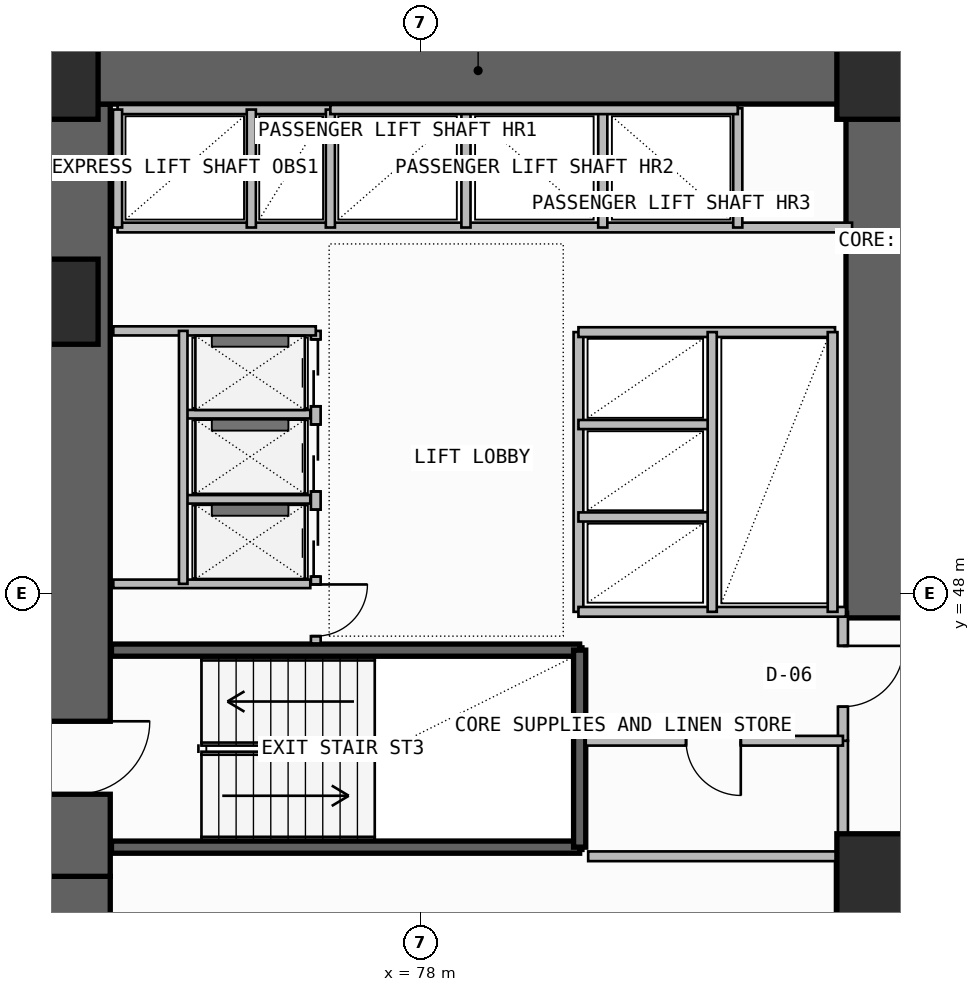
"""IFC4 building model, lengths in metres.
Left out: names, types, materials, properties, quantities, classifications, styles, units other than length and angle.
Written with IfcOpenShell. Run it as: python <this file> out.ifc"""

import sys

from ifc_helpers import new_model, si_unit, direction, frame, frame_2d, origin, origin_2d, place, context, subcontext, project, spatial, rectangle, extrude, element, fill, save


model = new_model("IFC4")
c1 = context("Model", 3, precision=1e-05, world=origin(), true_north=direction((0.0, 1.0)))
c2 = subcontext(c1, "Body", "Model", "MODEL_VIEW")
j1 = project(units=[si_unit("LENGTHUNIT", "METRE"), si_unit("PLANEANGLEUNIT", "RADIAN")], contexts=[c1])
p1 = place(None, origin())
s1 = spatial("IfcSite", under=j1, at=p1, CompositionType="ELEMENT")
p2 = place(p1, origin())
s2 = spatial("IfcBuilding", under=s1, at=p2, CompositionType="ELEMENT")
p3 = place(p2, frame((0.0, 0.0, 48.3)))
s3 = spatial("IfcBuildingStorey", under=s2, at=p3, CompositionType="ELEMENT", Elevation=48.3)
p4 = place(p3, frame((72.35, 35.5, -0.26), z_axis=(0.0, 0.0, 1.0), x_axis=(0.0, 1.0, 0.0)))
e1 = element("IfcWall", 1, at=p4, inside=s3, PredefinedType="SHEAR", context=c2, shape_type="SweptSolid", body=[
    extrude(rectangle(XDim=7.85, YDim=1.1, at=frame_2d((3.925, 0.0))), origin(), (0.0, 0.0, 1.0), 3.66),
])
p5 = place(p4, frame((1.45, 0.0, 0.26)))
e2 = element("IfcOpeningElement", 2, at=p5, cuts=e1, PredefinedType="OPENING", context=c2, shape_type="SweptSolid", body=[
    extrude(rectangle(XDim=1.2, YDim=2.2, at=frame_2d((0.6, 1.1))), frame((0.0, 0.56, 0.0), z_axis=(0.0, -1.0, 0.0), x_axis=(1.0, 0.0, 0.0)), (0.0, 0.0, 1.0), 1.12),
])
p6 = place(p3, frame((72.35, 43.35, -0.26), z_axis=(0.0, 0.0, 1.0), x_axis=(0.0, 1.0, 0.0)))
e3 = element("IfcWall", 3, at=p6, inside=s3, PredefinedType="SHEAR", context=c2, shape_type="SweptSolid", body=[
    extrude(rectangle(XDim=12.7, YDim=1.1, at=frame_2d((6.35, 0.0))), origin(), (0.0, 0.0, 1.0), 3.66),
])
p7 = place(p6, frame((1.35, 0.0, 0.26)))
e4 = element("IfcOpeningElement", 4, at=p7, cuts=e3, PredefinedType="OPENING", context=c2, shape_type="SweptSolid", body=[
    extrude(rectangle(XDim=1.2, YDim=2.2, at=frame_2d((0.6, 1.1))), frame((0.0, 0.56, 0.0), z_axis=(0.0, -1.0, 0.0), x_axis=(1.0, 0.0, 0.0)), (0.0, 0.0, 1.0), 1.12),
])
p8 = place(p3, frame((71.8, 56.6, -0.26), z_axis=(0.0, 0.0, 1.0), x_axis=(1.0, 0.0, 0.0)))
e5 = element("IfcWall", 5, at=p8, inside=s3, PredefinedType="SHEAR", context=c2, shape_type="SweptSolid", body=[
    extrude(rectangle(XDim=14.3, YDim=1.1, at=frame_2d((7.15, 0.0))), origin(), (0.0, 0.0, 1.0), 3.66),
])
p9 = place(p3, frame((85.55, 47.6, -0.26), z_axis=(0.0, 0.0, 1.0), x_axis=(0.0, 1.0, 0.0)))
e6 = element("IfcWall", 6, at=p9, inside=s3, PredefinedType="SHEAR", context=c2, shape_type="SweptSolid", body=[
    extrude(rectangle(XDim=8.45, YDim=1.1, at=frame_2d((4.225, 0.0))), origin(), (0.0, 0.0, 1.0), 3.66),
])
for number, where, z_axis, x_axis in (
    (7, (85.55, 43.35, 0.0), (0.0, 0.0, 1.0), (1.0, 0.0, 0.0)),
    (8, (72.0, 52.8, 0.0), (0.0, 0.0, 1.0), (1.0, 0.0, 0.0)),
    (9, (72.0, 56.5, 0.0), (0.0, 0.0, 1.0), (1.0, 0.0, 0.0)),
    (10, (85.55, 56.5, 0.0), (0.0, 0.0, 1.0), (1.0, 0.0, 0.0)),
):
    element("IfcColumn", number, at=place(p3, frame(where, z_axis=z_axis, x_axis=x_axis)), inside=s3, PredefinedType="COLUMN", context=c2, shape_type="SweptSolid", body=[
        extrude(rectangle(XDim=1.4, YDim=1.4, at=origin_2d()), origin(), (0.0, 0.0, 1.0), 3.6),
    ])
p10 = place(p3, frame((84.92, 38.85, 0.0), z_axis=(0.0, 0.0, 1.0), x_axis=(0.0, 1.0, 0.0)))
e11 = element("IfcWall", 11, at=p10, inside=s3, PredefinedType="SOLIDWALL", context=c2, shape_type="SweptSolid", body=[
    extrude(rectangle(XDim=4.83, YDim=0.2, at=frame_2d((2.415, 0.0))), origin(), (0.0, 0.0, 1.0), 3.4),
])
p11 = place(p10, frame((1.25, 0.0, 0.0)))
e12 = element("IfcOpeningElement", 12, at=p11, cuts=e11, PredefinedType="OPENING", context=c2, shape_type="SweptSolid", body=[
    extrude(rectangle(XDim=1.1, YDim=2.2, at=frame_2d((0.55, 1.1))), frame((0.0, 0.11, 0.0), z_axis=(0.0, -1.0, 0.0), x_axis=(1.0, 0.0, 0.0)), (0.0, 0.0, 1.0), 0.22),
])
for number, where, z_axis, x_axis in (
    (13, (72.92, 43.83, -0.26), (0.0, 0.0, 1.0), (1.0, 0.0, 0.0)),
    (14, (72.92, 47.07, -0.26), (0.0, 0.0, 1.0), (1.0, 0.0, 0.0)),
):
    element("IfcWall", number, at=place(p3, frame(where, z_axis=z_axis, x_axis=x_axis)), inside=s3, PredefinedType="SOLIDWALL", context=c2, shape_type="SweptSolid", body=[
        extrude(rectangle(XDim=7.7, YDim=0.2, at=frame_2d((3.85, 0.0))), origin(), (0.0, 0.0, 1.0), 3.66),
    ])
p12 = place(p3, frame((80.62, 43.83, -0.26), z_axis=(0.0, 0.0, 1.0), x_axis=(0.0, 1.0, 0.0)))
e15 = element("IfcWall", 15, at=p12, inside=s3, PredefinedType="SOLIDWALL", context=c2, shape_type="SweptSolid", body=[
    extrude(rectangle(XDim=3.24, YDim=0.2, at=frame_2d((1.62, 0.0))), origin(), (0.0, 0.0, 1.0), 3.66),
])
p13 = place(p3, frame((84.95, 43.68, 0.0), z_axis=(0.0, 0.0, 1.0), x_axis=(0.0, 1.0, 0.0)))
e16 = element("IfcWall", 16, at=p13, inside=s3, PredefinedType="PLUMBINGWALL", context=c2, shape_type="SweptSolid", body=[
    extrude(rectangle(XDim=1.9, YDim=0.165, at=frame_2d((0.95, 0.0))), origin(), (0.0, 0.0, 1.0), 3.4),
])
p14 = place(p3, frame((84.95, 45.58, 0.0), z_axis=(0.0, 0.0, 1.0), x_axis=(0.0, 1.0, 0.0)))
e17 = element("IfcWall", 17, at=p14, inside=s3, PredefinedType="PARTITIONING", context=c2, shape_type="SweptSolid", body=[
    extrude(rectangle(XDim=2.12, YDim=0.165, at=frame_2d((1.06, 0.0))), origin(), (0.0, 0.0, 1.0), 3.4),
])
p15 = place(p14, frame((0.56, 0.0, 0.0)))
e18 = element("IfcOpeningElement", 18, at=p15, cuts=e17, PredefinedType="OPENING", context=c2, shape_type="SweptSolid", body=[
    extrude(rectangle(XDim=1.0, YDim=2.2, at=frame_2d((0.5, 1.1))), frame((0.0, 0.093, 0.0), z_axis=(0.0, -1.0, 0.0), x_axis=(1.0, 0.0, 0.0)), (0.0, 0.0, 1.0), 0.185),
])
p16 = place(p3, frame((80.72, 45.58, 0.0), z_axis=(0.0, 0.0, 1.0), x_axis=(1.0, 0.0, 0.0)))
e19 = element("IfcWall", 19, at=p16, inside=s3, PredefinedType="PLUMBINGWALL", context=c2, shape_type="SweptSolid", body=[
    extrude(rectangle(XDim=4.23, YDim=0.16, at=frame_2d((2.115, 0.0))), origin(), (0.0, 0.0, 1.0), 3.4),
])
p17 = place(p16, frame((1.65, 0.0, 0.0)))
e20 = element("IfcOpeningElement", 20, at=p17, cuts=e19, PredefinedType="OPENING", context=c2, shape_type="SweptSolid", body=[
    extrude(rectangle(XDim=0.9, YDim=2.1, at=frame_2d((0.45, 1.05))), frame((0.0, 0.09, 0.0), z_axis=(0.0, -1.0, 0.0), x_axis=(1.0, 0.0, 0.0)), (0.0, 0.0, 1.0), 0.18),
])
p18 = place(p3, frame((80.76, 43.68, 0.0), z_axis=(0.0, 0.0, 1.0), x_axis=(1.0, 0.0, 0.0)))
e21 = element("IfcWall", 21, at=p18, inside=s3, PredefinedType="PLUMBINGWALL", context=c2, shape_type="SweptSolid", body=[
    extrude(rectangle(XDim=4.19, YDim=0.16, at=frame_2d((2.095, 0.0))), origin(), (0.0, 0.0, 1.0), 3.4),
])
p19 = place(p3, frame((76.28, 47.18, 0.0), z_axis=(0.0, 0.0, 1.0), x_axis=(0.0, 1.0, 0.0)))
e22 = element("IfcWall", 22, at=p19, inside=s3, PredefinedType="SOLIDWALL", context=c2, shape_type="SweptSolid", body=[
    extrude(rectangle(XDim=5.14, YDim=0.16, at=frame_2d((2.57, 0.0))), origin(), (0.0, 0.0, 1.0), 3.4),
])
p20 = place(p19, frame((1.1, 0.0, 0.0)))
e23 = element("IfcOpeningElement", 23, at=p20, cuts=e22, PredefinedType="OPENING", context=c2, shape_type="SweptSolid", body=[
    extrude(rectangle(XDim=1.1, YDim=2.25, at=frame_2d((0.55, 1.125))), frame((0.0, 0.09, 0.0), z_axis=(0.0, -1.0, 0.0), x_axis=(1.0, 0.0, 0.0)), (0.0, 0.0, 1.0), 0.18),
])
p21 = place(p19, frame((2.5, 0.0, 0.0)))
e24 = element("IfcOpeningElement", 24, at=p21, cuts=e22, PredefinedType="OPENING", context=c2, shape_type="SweptSolid", body=[
    extrude(rectangle(XDim=1.1, YDim=2.25, at=frame_2d((0.55, 1.125))), frame((0.0, 0.09, 0.0), z_axis=(0.0, -1.0, 0.0), x_axis=(1.0, 0.0, 0.0)), (0.0, 0.0, 1.0), 0.18),
])
p22 = place(p19, frame((3.9, 0.0, 0.0)))
e25 = element("IfcOpeningElement", 25, at=p22, cuts=e22, PredefinedType="OPENING", context=c2, shape_type="SweptSolid", body=[
    extrude(rectangle(XDim=1.1, YDim=2.25, at=frame_2d((0.55, 1.125))), frame((0.0, 0.09, 0.0), z_axis=(0.0, -1.0, 0.0), x_axis=(1.0, 0.0, 0.0)), (0.0, 0.0, 1.0), 0.18),
])
p23 = place(p19, frame((0.12, 0.0, 0.0)))
e26 = element("IfcOpeningElement", 26, at=p23, cuts=e22, PredefinedType="OPENING", context=c2, shape_type="SweptSolid", body=[
    extrude(rectangle(XDim=0.85, YDim=2.05, at=frame_2d((0.425, 1.025))), frame((0.0, 0.09, 0.0), z_axis=(0.0, -1.0, 0.0), x_axis=(1.0, 0.0, 0.0)), (0.0, 0.0, 1.0), 0.18),
])
p24 = place(p3, frame((72.95, 52.32, 0.0), z_axis=(0.0, 0.0, 1.0), x_axis=(1.0, 0.0, 0.0)))
e27 = element("IfcWall", 27, at=p24, inside=s3, PredefinedType="SOLIDWALL", context=c2, shape_type="SweptSolid", body=[
    extrude(rectangle(XDim=3.33, YDim=0.15, at=frame_2d((1.665, 0.0))), origin(), (0.0, 0.0, 1.0), 3.4),
])
p25 = place(p3, frame((72.95, 48.16, 0.0), z_axis=(0.0, 0.0, 1.0), x_axis=(1.0, 0.0, 0.0)))
e28 = element("IfcWall", 28, at=p25, inside=s3, PredefinedType="PLUMBINGWALL", context=c2, shape_type="SweptSolid", body=[
    extrude(rectangle(XDim=3.24, YDim=0.14, at=frame_2d((1.62, 0.0))), origin(), (0.0, 0.0, 1.0), 3.4),
])
for number, where, z_axis, x_axis in (
    (29, (74.15, 49.55, 0.0), (0.0, 0.0, 1.0), (1.0, 0.0, 0.0)),
    (30, (74.15, 50.95, 0.0), (0.0, 0.0, 1.0), (1.0, 0.0, 0.0)),
):
    element("IfcWall", number, at=place(p3, frame(where, z_axis=z_axis, x_axis=x_axis)), inside=s3, PredefinedType="PLUMBINGWALL", context=c2, shape_type="SweptSolid", body=[
        extrude(rectangle(XDim=2.04, YDim=0.14, at=frame_2d((1.02, 0.0))), origin(), (0.0, 0.0, 1.0), 3.4),
    ])
p26 = place(p3, frame((74.1, 48.16, 0.0), z_axis=(0.0, 0.0, 1.0), x_axis=(0.0, 1.0, 0.0)))
e31 = element("IfcWall", 31, at=p26, inside=s3, PredefinedType="PLUMBINGWALL", context=c2, shape_type="SweptSolid", body=[
    extrude(rectangle(XDim=4.16, YDim=0.14, at=frame_2d((2.08, 0.0))), origin(), (0.0, 0.0, 1.0), 3.4),
])
p27 = place(p3, frame((80.6, 47.7, 0.0), z_axis=(0.0, 0.0, 1.0), x_axis=(0.0, 1.0, 0.0)))
e32 = element("IfcWall", 32, at=p27, inside=s3, PredefinedType="SOLIDWALL", context=c2, shape_type="SweptSolid", body=[
    extrude(rectangle(XDim=4.6, YDim=0.16, at=frame_2d((2.3, 0.0))), origin(), (0.0, 0.0, 1.0), 3.4),
])
p28 = place(p3, frame((80.6, 47.7, 0.0), z_axis=(0.0, 0.0, 1.0), x_axis=(1.0, 0.0, 0.0)))
e33 = element("IfcWall", 33, at=p28, inside=s3, PredefinedType="SOLIDWALL", context=c2, shape_type="SweptSolid", body=[
    extrude(rectangle(XDim=4.4, YDim=0.16, at=frame_2d((2.2, 0.0))), origin(), (0.0, 0.0, 1.0), 3.4),
])
p29 = place(p3, frame((80.6, 52.3, 0.0), z_axis=(0.0, 0.0, 1.0), x_axis=(1.0, 0.0, 0.0)))
e34 = element("IfcWall", 34, at=p29, inside=s3, PredefinedType="SOLIDWALL", context=c2, shape_type="SweptSolid", body=[
    extrude(rectangle(XDim=4.22, YDim=0.16, at=frame_2d((2.11, 0.0))), origin(), (0.0, 0.0, 1.0), 3.4),
])
for number, where, z_axis, x_axis in (
    (35, (80.6, 49.26, 0.0), (0.0, 0.0, 1.0), (1.0, 0.0, 0.0)),
    (36, (80.6, 50.78, 0.0), (0.0, 0.0, 1.0), (1.0, 0.0, 0.0)),
):
    element("IfcWall", number, at=place(p3, frame(where, z_axis=z_axis, x_axis=x_axis)), inside=s3, PredefinedType="PLUMBINGWALL", context=c2, shape_type="SweptSolid", body=[
        extrude(rectangle(XDim=2.2, YDim=0.15, at=frame_2d((1.1, 0.0))), origin(), (0.0, 0.0, 1.0), 3.4),
    ])
p30 = place(p3, frame((82.8, 47.7, 0.0), z_axis=(0.0, 0.0, 1.0), x_axis=(0.0, 1.0, 0.0)))
e37 = element("IfcWall", 37, at=p30, inside=s3, PredefinedType="PLUMBINGWALL", context=c2, shape_type="SweptSolid", body=[
    extrude(rectangle(XDim=4.6, YDim=0.15, at=frame_2d((2.3, 0.0))), origin(), (0.0, 0.0, 1.0), 3.4),
])
p31 = place(p3, frame((84.78, 47.7, 0.0), z_axis=(0.0, 0.0, 1.0), x_axis=(0.0, 1.0, 0.0)))
e38 = element("IfcWall", 38, at=p31, inside=s3, PredefinedType="SOLIDWALL", context=c2, shape_type="SweptSolid", body=[
    extrude(rectangle(XDim=4.6, YDim=0.16, at=frame_2d((2.3, 0.0))), origin(), (0.0, 0.0, 1.0), 3.4),
])
p32 = place(p3, frame((73.02, 54.02, 0.0), z_axis=(0.0, 0.0, 1.0), x_axis=(1.0, 0.0, 0.0)))
e39 = element("IfcWall", 39, at=p32, inside=s3, PredefinedType="SOLIDWALL", context=c2, shape_type="SweptSolid", body=[
    extrude(rectangle(XDim=12.08, YDim=0.16, at=frame_2d((6.04, 0.0))), origin(), (0.0, 0.0, 1.0), 3.4),
])
p33 = place(p3, frame((73.02, 55.96, 0.0), z_axis=(0.0, 0.0, 1.0), x_axis=(1.0, 0.0, 0.0)))
e40 = element("IfcWall", 40, at=p33, inside=s3, PredefinedType="SOLIDWALL", context=c2, shape_type="SweptSolid", body=[
    extrude(rectangle(XDim=3.5, YDim=0.15, at=frame_2d((1.75, 0.0))), origin(), (0.0, 0.0, 1.0), 3.4),
])
p34 = place(p3, frame((73.02, 54.02, 0.0), z_axis=(0.0, 0.0, 1.0), x_axis=(0.0, 1.0, 0.0)))
e41 = element("IfcWall", 41, at=p34, inside=s3, PredefinedType="PLUMBINGWALL", context=c2, shape_type="SweptSolid", body=[
    extrude(rectangle(XDim=1.94, YDim=0.15, at=frame_2d((0.97, 0.0))), origin(), (0.0, 0.0, 1.0), 3.4),
])
p35 = place(p3, frame((76.52, 54.02, 0.0), z_axis=(0.0, 0.0, 1.0), x_axis=(0.0, 1.0, 0.0)))
e42 = element("IfcWall", 42, at=p35, inside=s3, PredefinedType="SOLIDWALL", context=c2, shape_type="SweptSolid", body=[
    extrude(rectangle(XDim=1.94, YDim=0.15, at=frame_2d((0.97, 0.0))), origin(), (0.0, 0.0, 1.0), 3.4),
])
p36 = place(p3, frame((75.22, 54.02, 0.0), z_axis=(0.0, 0.0, 1.0), x_axis=(0.0, 1.0, 0.0)))
e43 = element("IfcWall", 43, at=p36, inside=s3, PredefinedType="PLUMBINGWALL", context=c2, shape_type="SweptSolid", body=[
    extrude(rectangle(XDim=1.94, YDim=0.15, at=frame_2d((0.97, 0.0))), origin(), (0.0, 0.0, 1.0), 3.4),
])
for number, where, z_axis, x_axis in (
    (44, (78.75, 54.02, 0.0), (0.0, 0.0, 1.0), (0.0, 1.0, 0.0)),
    (45, (81.0, 54.02, 0.0), (0.0, 0.0, 1.0), (0.0, 1.0, 0.0)),
):
    element("IfcWall", number, at=place(p3, frame(where, z_axis=z_axis, x_axis=x_axis)), inside=s3, PredefinedType="PLUMBINGWALL", context=c2, shape_type="SweptSolid", body=[
        extrude(rectangle(XDim=1.96, YDim=0.15, at=frame_2d((0.98, 0.0))), origin(), (0.0, 0.0, 1.0), 3.4),
    ])
p37 = place(p3, frame((83.22, 54.02, 0.0), z_axis=(0.0, 0.0, 1.0), x_axis=(0.0, 1.0, 0.0)))
e46 = element("IfcWall", 46, at=p37, inside=s3, PredefinedType="SOLIDWALL", context=c2, shape_type="SweptSolid", body=[
    extrude(rectangle(XDim=1.96, YDim=0.15, at=frame_2d((0.98, 0.0))), origin(), (0.0, 0.0, 1.0), 3.4),
])
p38 = place(p3, frame((76.52, 55.96, 0.0), z_axis=(0.0, 0.0, 1.0), x_axis=(1.0, 0.0, 0.0)))
e47 = element("IfcWall", 47, at=p38, inside=s3, PredefinedType="SOLIDWALL", context=c2, shape_type="SweptSolid", body=[
    extrude(rectangle(XDim=6.7, YDim=0.15, at=frame_2d((3.35, 0.0))), origin(), (0.0, 0.0, 1.0), 3.4),
])
p39 = place(p7, frame((1.2, 0.0, 0.0), z_axis=(0.0, 0.0, 1.0), x_axis=(-1.0, 0.0, 0.0)))
e48 = element("IfcDoor", 48, at=p39, inside=s3, OperationType="SINGLE_SWING_LEFT", PredefinedType="USERDEFINED", context=c2, shape_type="SweptSolid", body=[
    extrude(rectangle(XDim=1.2, YDim=2.2, at=frame_2d((0.6, 1.1))), frame((0.0, 0.025, 0.0), z_axis=(0.0, -1.0, 0.0), x_axis=(1.0, 0.0, 0.0)), (0.0, 0.0, 1.0), 0.05),
])
fill(e4, e48)
p40 = place(p15, frame((1.0, 0.0, 0.0), z_axis=(0.0, 0.0, 1.0), x_axis=(-1.0, 0.0, 0.0)))
e49 = element("IfcDoor", 49, at=p40, inside=s3, OperationType="SINGLE_SWING_LEFT", PredefinedType="DOOR", context=c2, shape_type="SweptSolid", body=[
    extrude(rectangle(XDim=1.0, YDim=2.2, at=frame_2d((0.5, 1.1))), frame((0.0, 0.025, 0.0), z_axis=(0.0, -1.0, 0.0), x_axis=(1.0, 0.0, 0.0)), (0.0, 0.0, 1.0), 0.05),
])
fill(e18, e49)
p41 = place(p17, frame((0.9, 0.0, 0.0), z_axis=(0.0, 0.0, 1.0), x_axis=(-1.0, 0.0, 0.0)))
e50 = element("IfcDoor", 50, at=p41, inside=s3, OperationType="SINGLE_SWING_LEFT", PredefinedType="DOOR", context=c2, shape_type="SweptSolid", body=[
    extrude(rectangle(XDim=0.9, YDim=2.1, at=frame_2d((0.45, 1.05))), frame((0.0, 0.025, 0.0), z_axis=(0.0, -1.0, 0.0), x_axis=(1.0, 0.0, 0.0)), (0.0, 0.0, 1.0), 0.05),
])
fill(e20, e50)
p42 = place(p20, origin())
e51 = element("IfcDoor", 51, at=p42, inside=s3, OperationType="DOUBLE_DOOR_SLIDING", PredefinedType="DOOR", context=c2, shape_type="SweptSolid", body=[
    extrude(rectangle(XDim=1.1, YDim=2.25, at=frame_2d((0.55, 1.125))), frame((0.0, 0.025, 0.0), z_axis=(0.0, -1.0, 0.0), x_axis=(1.0, 0.0, 0.0)), (0.0, 0.0, 1.0), 0.05),
])
fill(e23, e51)
p43 = place(p21, origin())
e52 = element("IfcDoor", 52, at=p43, inside=s3, OperationType="DOUBLE_DOOR_SLIDING", PredefinedType="DOOR", context=c2, shape_type="SweptSolid", body=[
    extrude(rectangle(XDim=1.1, YDim=2.25, at=frame_2d((0.55, 1.125))), frame((0.0, 0.025, 0.0), z_axis=(0.0, -1.0, 0.0), x_axis=(1.0, 0.0, 0.0)), (0.0, 0.0, 1.0), 0.05),
])
fill(e24, e52)
p44 = place(p22, origin())
e53 = element("IfcDoor", 53, at=p44, inside=s3, OperationType="DOUBLE_DOOR_SLIDING", PredefinedType="DOOR", context=c2, shape_type="SweptSolid", body=[
    extrude(rectangle(XDim=1.1, YDim=2.25, at=frame_2d((0.55, 1.125))), frame((0.0, 0.025, 0.0), z_axis=(0.0, -1.0, 0.0), x_axis=(1.0, 0.0, 0.0)), (0.0, 0.0, 1.0), 0.05),
])
fill(e25, e53)
p45 = place(p23, frame((0.85, 0.0, 0.0), z_axis=(0.0, 0.0, 1.0), x_axis=(-1.0, 0.0, 0.0)))
e54 = element("IfcDoor", 54, at=p45, inside=s3, OperationType="SINGLE_SWING_LEFT", PredefinedType="DOOR", context=c2, shape_type="SweptSolid", body=[
    extrude(rectangle(XDim=0.85, YDim=2.05, at=frame_2d((0.425, 1.025))), frame((0.0, 0.025, 0.0), z_axis=(0.0, -1.0, 0.0), x_axis=(1.0, 0.0, 0.0)), (0.0, 0.0, 1.0), 0.05),
])
fill(e26, e54)
save(model, sys.argv[1])
